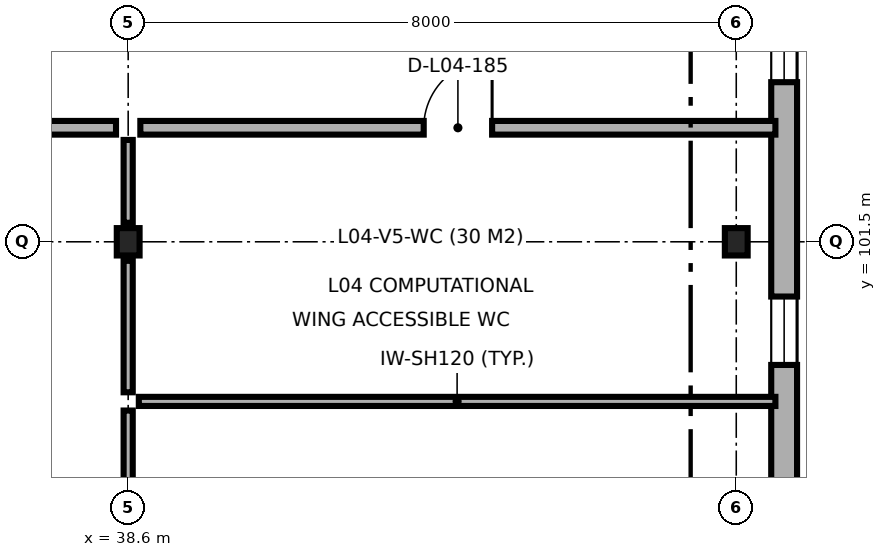
"""IFC4 building model, lengths in metres.
Left out: names, types, materials, properties, quantities, classifications, styles, units other than length and angle.
Written with IfcOpenShell. Run it as: python <this file> out.ifc"""

import sys

from ifc_helpers import new_model, si_unit, direction, frame, frame_2d, origin, origin_2d, place, context, subcontext, project, spatial, rectangle, i_section, extrude, element, fill, save


model = new_model("IFC4")
c1 = context("Model", 3, precision=1e-05, world=origin(), true_north=direction((0.0, 1.0)))
c2 = subcontext(c1, "Body", "Model", "MODEL_VIEW")
j1 = project(units=[si_unit("LENGTHUNIT", "METRE"), si_unit("PLANEANGLEUNIT", "RADIAN")], contexts=[c1])
p1 = place(None, origin())
s1 = spatial("IfcSite", under=j1, at=p1, CompositionType="ELEMENT")
p2 = place(p1, origin())
s2 = spatial("IfcBuilding", under=s1, at=p2, CompositionType="ELEMENT")
p3 = place(p2, frame((0.0, 0.0, 18.3)))
s3 = spatial("IfcBuildingStorey", under=s2, at=p3, CompositionType="ELEMENT", Elevation=18.3)
for number, where, z_axis, x_axis in (
    (1, (38.6, 101.5, 0.0), (0.0, 0.0, 1.0), (1.0, 0.0, 0.0)),
    (2, (46.6, 101.5, 0.0), (0.0, 0.0, 1.0), (1.0, 0.0, 0.0)),
):
    element("IfcColumn", number, at=place(p3, frame(where, z_axis=z_axis, x_axis=x_axis)), inside=s3, PredefinedType="COLUMN", context=c2, shape_type="SweptSolid", body=[
        extrude(i_section(OverallWidth=0.3, OverallDepth=0.36, WebThickness=0.012, FlangeThickness=0.022, FilletRadius=0.027, at=origin_2d()), origin(), (0.0, 0.0, 1.0), 4.5),
    ])
p4 = place(p3, frame((47.23, 88.623, 0.0), z_axis=(0.0, 0.0, 1.0), x_axis=(0.0, 1.0, 0.0)))
e3 = element("IfcWall", 3, at=p4, inside=s3, PredefinedType="SOLIDWALL", context=c2, shape_type="SweptSolid", body=[
    extrude(rectangle(XDim=27.477, YDim=0.34, at=frame_2d((13.739, 0.0))), origin(), (0.0, 0.0, 1.0), 4.28),
])
p5 = place(p4, frame((1.514, 0.0, 0.9)))
e4 = element("IfcOpeningElement", 4, at=p5, cuts=e3, PredefinedType="OPENING", context=c2, shape_type="SweptSolid", body=[
    extrude(rectangle(XDim=1.95, YDim=1.95, at=frame_2d((0.975, 0.975))), frame((0.0, 0.18, 0.0), z_axis=(0.0, -1.0, 0.0), x_axis=(1.0, 0.0, 0.0)), (0.0, 0.0, 1.0), 0.36),
])
p6 = place(p4, frame((6.672, 0.0, 0.9)))
e5 = element("IfcOpeningElement", 5, at=p6, cuts=e3, PredefinedType="OPENING", context=c2, shape_type="SweptSolid", body=[
    extrude(rectangle(XDim=2.55, YDim=1.95, at=frame_2d((1.275, 0.975))), frame((0.0, 0.18, 0.0), z_axis=(0.0, -1.0, 0.0), x_axis=(1.0, 0.0, 0.0)), (0.0, 0.0, 1.0), 0.36),
])
p7 = place(p4, frame((11.257, 0.0, 0.9)))
e6 = element("IfcOpeningElement", 6, at=p7, cuts=e3, PredefinedType="OPENING", context=c2, shape_type="SweptSolid", body=[
    extrude(rectangle(XDim=0.9, YDim=1.8, at=frame_2d((0.45, 0.9))), frame((0.0, 0.18, 0.0), z_axis=(0.0, -1.0, 0.0), x_axis=(1.0, 0.0, 0.0)), (0.0, 0.0, 1.0), 0.36),
])
p8 = place(p4, frame((14.977, 0.0, 0.9)))
e7 = element("IfcOpeningElement", 7, at=p8, cuts=e3, PredefinedType="OPENING", context=c2, shape_type="SweptSolid", body=[
    extrude(rectangle(XDim=1.2, YDim=1.8, at=frame_2d((0.6, 0.9))), frame((0.0, 0.18, 0.0), z_axis=(0.0, -1.0, 0.0), x_axis=(1.0, 0.0, 0.0)), (0.0, 0.0, 1.0), 0.36),
])
p9 = place(p4, frame((17.807, 0.0, 0.9)))
e8 = element("IfcOpeningElement", 8, at=p9, cuts=e3, PredefinedType="OPENING", context=c2, shape_type="SweptSolid", body=[
    extrude(rectangle(XDim=1.8, YDim=1.8, at=frame_2d((0.9, 0.9))), frame((0.0, 0.18, 0.0), z_axis=(0.0, -1.0, 0.0), x_axis=(1.0, 0.0, 0.0)), (0.0, 0.0, 1.0), 0.36),
])
p10 = place(p4, frame((22.667, 0.0, 0.9)))
e9 = element("IfcOpeningElement", 9, at=p10, cuts=e3, PredefinedType="OPENING", context=c2, shape_type="SweptSolid", body=[
    extrude(rectangle(XDim=2.4, YDim=1.8, at=frame_2d((1.2, 0.9))), frame((0.0, 0.18, 0.0), z_axis=(0.0, -1.0, 0.0), x_axis=(1.0, 0.0, 0.0)), (0.0, 0.0, 1.0), 0.36),
])
p11 = place(p3, frame((38.74, 99.4, 0.0), z_axis=(0.0, 0.0, 1.0), x_axis=(1.0, 0.0, 0.0)))
e10 = element("IfcWall", 10, at=p11, inside=s3, PredefinedType="PARTITIONING", context=c2, shape_type="SweptSolid", body=[
    extrude(rectangle(XDim=8.375, YDim=0.12, at=frame_2d((4.188, 0.0))), origin(), (0.0, 0.0, 1.0), 4.28),
])
p12 = place(p3, frame((38.6, 93.75, 0.0), z_axis=(0.0, 0.0, 1.0), x_axis=(0.0, 1.0, 0.0)))
e11 = element("IfcWall", 11, at=p12, inside=s3, PredefinedType="PARTITIONING", context=c2, shape_type="SweptSolid", body=[
    extrude(rectangle(XDim=5.53, YDim=0.12, at=frame_2d((2.765, 0.0))), origin(), (0.0, 0.0, 1.0), 3.84),
])
p13 = place(p3, frame((38.6, 99.52, 0.0), z_axis=(0.0, 0.0, 1.0), x_axis=(0.0, 1.0, 0.0)))
e12 = element("IfcWall", 12, at=p13, inside=s3, PredefinedType="PARTITIONING", context=c2, shape_type="SweptSolid", body=[
    extrude(rectangle(XDim=1.73, YDim=0.12, at=frame_2d((0.865, 0.0))), origin(), (0.0, 0.0, 1.0), 3.88),
])
p14 = place(p3, frame((38.6, 101.75, 0.0), z_axis=(0.0, 0.0, 1.0), x_axis=(0.0, 1.0, 0.0)))
e13 = element("IfcWall", 13, at=p14, inside=s3, PredefinedType="PARTITIONING", context=c2, shape_type="SweptSolid", body=[
    extrude(rectangle(XDim=1.09, YDim=0.12, at=frame_2d((0.545, 0.0))), origin(), (0.0, 0.0, 1.0), 3.88),
])
p15 = place(p3, frame((30.56, 103.0, 0.0), z_axis=(0.0, 0.0, 1.0), x_axis=(1.0, 0.0, 0.0)))
e14 = element("IfcWall", 14, at=p15, inside=s3, PredefinedType="PARTITIONING", context=c2, shape_type="SweptSolid", body=[
    extrude(rectangle(XDim=7.88, YDim=0.18, at=frame_2d((3.94, 0.0))), origin(), (0.0, 0.0, 1.0), 4.28),
])
p16 = place(p15, frame((3.39, 0.0, 0.0)))
e15 = element("IfcOpeningElement", 15, at=p16, cuts=e14, PredefinedType="OPENING", context=c2, shape_type="SweptSolid", body=[
    extrude(rectangle(XDim=1.1, YDim=2.15, at=frame_2d((0.55, 1.075))), frame((0.0, 0.1, 0.0), z_axis=(0.0, -1.0, 0.0), x_axis=(1.0, 0.0, 0.0)), (0.0, 0.0, 1.0), 0.2),
])
p17 = place(p3, frame((38.76, 103.0, 0.0), z_axis=(0.0, 0.0, 1.0), x_axis=(1.0, 0.0, 0.0)))
e16 = element("IfcWall", 16, at=p17, inside=s3, PredefinedType="PARTITIONING", context=c2, shape_type="SweptSolid", body=[
    extrude(rectangle(XDim=8.355, YDim=0.18, at=frame_2d((4.177, 0.0))), origin(), (0.0, 0.0, 1.0), 4.28),
])
p18 = place(p17, frame((3.728, 0.0, 0.0)))
e17 = element("IfcOpeningElement", 17, at=p18, cuts=e16, PredefinedType="OPENING", context=c2, shape_type="SweptSolid", body=[
    extrude(rectangle(XDim=0.9, YDim=2.1, at=frame_2d((0.45, 1.05))), frame((0.0, 0.1, 0.0), z_axis=(0.0, -1.0, 0.0), x_axis=(1.0, 0.0, 0.0)), (0.0, 0.0, 1.0), 0.2),
])
p19 = place(p7, origin())
e18 = element("IfcWindow", 18, at=p19, inside=s3, PartitioningType="SINGLE_PANEL", PredefinedType="WINDOW", context=c2, shape_type="SweptSolid", body=[
    extrude(rectangle(XDim=0.9, YDim=1.8, at=frame_2d((0.45, 0.9))), frame((0.0, 0.03, 0.0), z_axis=(0.0, -1.0, 0.0), x_axis=(1.0, 0.0, 0.0)), (0.0, 0.0, 1.0), 0.06),
])
fill(e6, e18)
p20 = place(p8, origin())
e19 = element("IfcWindow", 19, at=p20, inside=s3, PartitioningType="SINGLE_PANEL", PredefinedType="WINDOW", context=c2, shape_type="SweptSolid", body=[
    extrude(rectangle(XDim=1.2, YDim=1.8, at=frame_2d((0.6, 0.9))), frame((0.0, 0.03, 0.0), z_axis=(0.0, -1.0, 0.0), x_axis=(1.0, 0.0, 0.0)), (0.0, 0.0, 1.0), 0.06),
])
fill(e7, e19)
p21 = place(p18, origin())
e20 = element("IfcDoor", 20, at=p21, inside=s3, OperationType="SINGLE_SWING_RIGHT", PredefinedType="DOOR", context=c2, shape_type="SweptSolid", body=[
    extrude(rectangle(XDim=0.9, YDim=2.1, at=frame_2d((0.45, 1.05))), frame((0.0, 0.025, 0.0), z_axis=(0.0, -1.0, 0.0), x_axis=(1.0, 0.0, 0.0)), (0.0, 0.0, 1.0), 0.05),
])
fill(e17, e20)
save(model, sys.argv[1])
